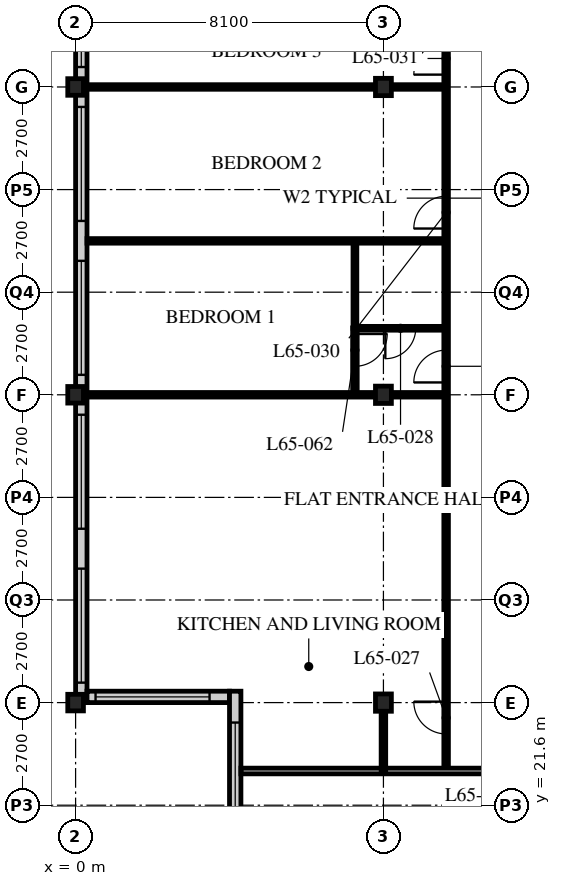
"""IFC4 building model, lengths in metres.
Left out: names, types, materials, properties, quantities, classifications, styles, units other than length and angle.
Written with IfcOpenShell. Run it as: python <this file> out.ifc"""

import sys

from ifc_helpers import new_model, si_unit, direction, frame, frame_2d, origin, origin_2d, place, context, subcontext, project, spatial, rectangle, i_section, extrude, element, fill, save


model = new_model("IFC4")
c1 = context("Model", 3, precision=1e-05, world=origin(), true_north=direction((0.0, 1.0)))
c2 = subcontext(c1, "Body", "Model", "MODEL_VIEW")
j1 = project(units=[si_unit("LENGTHUNIT", "METRE"), si_unit("PLANEANGLEUNIT", "RADIAN")], contexts=[c1])
p1 = place(None, origin())
s1 = spatial("IfcSite", under=j1, at=p1, CompositionType="ELEMENT")
p2 = place(p1, origin())
s2 = spatial("IfcBuilding", under=s1, at=p2, CompositionType="ELEMENT")
p3 = place(p2, frame((0.0, 0.0, 254.1)))
s3 = spatial("IfcBuildingStorey", under=s2, at=p3, CompositionType="ELEMENT", Elevation=254.1)
for number, where, z_axis, x_axis in (
    (1, (0.0, 24.3, 0.0), (0.0, 0.0, 1.0), (1.0, 0.0, 0.0)),
    (2, (0.0, 32.4, 0.0), (0.0, 0.0, 1.0), (1.0, 0.0, 0.0)),
    (3, (0.0, 40.5, 0.0), (0.0, 0.0, 1.0), (1.0, 0.0, 0.0)),
):
    element("IfcColumn", number, at=place(p3, frame(where, z_axis=z_axis, x_axis=x_axis)), inside=s3, PredefinedType="COLUMN", context=c2, shape_type="SweptSolid", body=[
        extrude(i_section(OverallWidth=0.412, OverallDepth=0.437, WebThickness=0.036, FlangeThickness=0.058, FilletRadius=0.015, at=origin_2d()), origin(), (0.0, 0.0, 1.0), 3.9),
    ])
for number, where, z_axis, x_axis in (
    (4, (8.1, 24.3, 0.0), (0.0, 0.0, 1.0), (1.0, 0.0, 0.0)),
    (5, (8.1, 32.4, 0.0), (0.0, 0.0, 1.0), (1.0, 0.0, 0.0)),
    (6, (8.1, 40.5, 0.0), (0.0, 0.0, 1.0), (1.0, 0.0, 0.0)),
):
    element("IfcColumn", number, at=place(p3, frame(where, z_axis=z_axis, x_axis=x_axis)), inside=s3, PredefinedType="COLUMN", context=c2, shape_type="SweptSolid", body=[
        extrude(i_section(OverallWidth=0.418, OverallDepth=0.456, WebThickness=0.042, FlangeThickness=0.067, FilletRadius=0.015, at=origin_2d()), origin(), (0.0, 0.0, 1.0), 3.9),
    ])
p4 = place(p3, frame((0.15, 56.4, 0.0), z_axis=(0.0, 0.0, 1.0), x_axis=(0.0, -1.0, 0.0)))
e7 = element("IfcWall", 7, at=p4, inside=s3, PredefinedType="SOLIDWALL", context=c2, shape_type="SweptSolid", body=[
    extrude(rectangle(XDim=32.1, YDim=0.3, at=frame_2d((16.05, 0.0))), origin(), (0.0, 0.0, 1.0), 3.69),
])
p5 = place(p4, frame((0.225, 0.0, 0.6)))
e8 = element("IfcOpeningElement", 8, at=p5, cuts=e7, PredefinedType="OPENING", context=c2, shape_type="SweptSolid", body=[
    extrude(rectangle(XDim=3.0, YDim=2.4, at=frame_2d((1.5, 1.2))), frame((0.0, 0.16, 0.0), z_axis=(0.0, -1.0, 0.0), x_axis=(1.0, 0.0, 0.0)), (0.0, 0.0, 1.0), 0.32),
])
p6 = place(p4, frame((4.275, 0.0, 0.6)))
e9 = element("IfcOpeningElement", 9, at=p6, cuts=e7, PredefinedType="OPENING", context=c2, shape_type="SweptSolid", body=[
    extrude(rectangle(XDim=3.0, YDim=2.4, at=frame_2d((1.5, 1.2))), frame((0.0, 0.16, 0.0), z_axis=(0.0, -1.0, 0.0), x_axis=(1.0, 0.0, 0.0)), (0.0, 0.0, 1.0), 0.32),
])
p7 = place(p4, frame((8.325, 0.0, 0.6)))
e10 = element("IfcOpeningElement", 10, at=p7, cuts=e7, PredefinedType="OPENING", context=c2, shape_type="SweptSolid", body=[
    extrude(rectangle(XDim=3.0, YDim=2.4, at=frame_2d((1.5, 1.2))), frame((0.0, 0.16, 0.0), z_axis=(0.0, -1.0, 0.0), x_axis=(1.0, 0.0, 0.0)), (0.0, 0.0, 1.0), 0.32),
])
p8 = place(p4, frame((12.375, 0.0, 0.6)))
e11 = element("IfcOpeningElement", 11, at=p8, cuts=e7, PredefinedType="OPENING", context=c2, shape_type="SweptSolid", body=[
    extrude(rectangle(XDim=3.0, YDim=2.4, at=frame_2d((1.5, 1.2))), frame((0.0, 0.16, 0.0), z_axis=(0.0, -1.0, 0.0), x_axis=(1.0, 0.0, 0.0)), (0.0, 0.0, 1.0), 0.32),
])
p9 = place(p4, frame((16.425, 0.0, 0.6)))
e12 = element("IfcOpeningElement", 12, at=p9, cuts=e7, PredefinedType="OPENING", context=c2, shape_type="SweptSolid", body=[
    extrude(rectangle(XDim=3.0, YDim=2.4, at=frame_2d((1.5, 1.2))), frame((0.0, 0.16, 0.0), z_axis=(0.0, -1.0, 0.0), x_axis=(1.0, 0.0, 0.0)), (0.0, 0.0, 1.0), 0.32),
])
p10 = place(p4, frame((20.475, 0.0, 0.6)))
e13 = element("IfcOpeningElement", 13, at=p10, cuts=e7, PredefinedType="OPENING", context=c2, shape_type="SweptSolid", body=[
    extrude(rectangle(XDim=3.0, YDim=2.4, at=frame_2d((1.5, 1.2))), frame((0.0, 0.16, 0.0), z_axis=(0.0, -1.0, 0.0), x_axis=(1.0, 0.0, 0.0)), (0.0, 0.0, 1.0), 0.32),
])
p11 = place(p4, frame((24.525, 0.0, 0.6)))
e14 = element("IfcOpeningElement", 14, at=p11, cuts=e7, PredefinedType="OPENING", context=c2, shape_type="SweptSolid", body=[
    extrude(rectangle(XDim=3.0, YDim=2.4, at=frame_2d((1.5, 1.2))), frame((0.0, 0.16, 0.0), z_axis=(0.0, -1.0, 0.0), x_axis=(1.0, 0.0, 0.0)), (0.0, 0.0, 1.0), 0.32),
])
p12 = place(p4, frame((28.575, 0.0, 0.6)))
e15 = element("IfcOpeningElement", 15, at=p12, cuts=e7, PredefinedType="OPENING", context=c2, shape_type="SweptSolid", body=[
    extrude(rectangle(XDim=3.0, YDim=2.4, at=frame_2d((1.5, 1.2))), frame((0.0, 0.16, 0.0), z_axis=(0.0, -1.0, 0.0), x_axis=(1.0, 0.0, 0.0)), (0.0, 0.0, 1.0), 0.32),
])
p13 = place(p3, frame((0.3, 24.45, 0.0), z_axis=(0.0, 0.0, 1.0), x_axis=(1.0, 0.0, 0.0)))
e16 = element("IfcWall", 16, at=p13, inside=s3, PredefinedType="SOLIDWALL", context=c2, shape_type="SweptSolid", body=[
    extrude(rectangle(XDim=3.75, YDim=0.3, at=frame_2d((1.875, 0.0))), origin(), (0.0, 0.0, 1.0), 3.69),
])
p14 = place(p13, frame((0.225, 0.0, 0.6)))
e17 = element("IfcOpeningElement", 17, at=p14, cuts=e16, PredefinedType="OPENING", context=c2, shape_type="SweptSolid", body=[
    extrude(rectangle(XDim=3.0, YDim=2.3, at=frame_2d((1.5, 1.15))), frame((0.0, 0.16, 0.0), z_axis=(0.0, -1.0, 0.0), x_axis=(1.0, 0.0, 0.0)), (0.0, 0.0, 1.0), 0.32),
])
p15 = place(p3, frame((4.2, 24.6, 0.0), z_axis=(0.0, 0.0, 1.0), x_axis=(0.0, -1.0, 0.0)))
e18 = element("IfcWall", 18, at=p15, inside=s3, PredefinedType="SOLIDWALL", context=c2, shape_type="SweptSolid", body=[
    extrude(rectangle(XDim=4.35, YDim=0.3, at=frame_2d((2.175, 0.0))), origin(), (0.0, 0.0, 1.0), 3.69),
])
p16 = place(p15, frame((0.825, 0.0, 0.6)))
e19 = element("IfcOpeningElement", 19, at=p16, cuts=e18, PredefinedType="OPENING", context=c2, shape_type="SweptSolid", body=[
    extrude(rectangle(XDim=3.0, YDim=2.3, at=frame_2d((1.5, 1.15))), frame((0.0, 0.16, 0.0), z_axis=(0.0, -1.0, 0.0), x_axis=(1.0, 0.0, 0.0)), (0.0, 0.0, 1.0), 0.32),
])
p17 = place(p3, frame((9.75, 22.5, 0.0), z_axis=(0.0, 0.0, 1.0), x_axis=(0.0, 1.0, 0.0)))
e20 = element("IfcWall", 20, at=p17, inside=s3, PredefinedType="PARTITIONING", context=c2, shape_type="SweptSolid", body=[
    extrude(rectangle(XDim=22.05, YDim=0.12, at=frame_2d((11.025, 0.0))), origin(), (0.0, 0.0, 1.0), 3.69),
])
p18 = place(p17, frame((0.975, 0.0, 0.0)))
e21 = element("IfcOpeningElement", 21, at=p18, cuts=e20, PredefinedType="OPENING", context=c2, shape_type="SweptSolid", body=[
    extrude(rectangle(XDim=0.85, YDim=2.1, at=frame_2d((0.425, 1.05))), frame((0.0, 0.07, 0.0), z_axis=(0.0, -1.0, 0.0), x_axis=(1.0, 0.0, 0.0)), (0.0, 0.0, 1.0), 0.14),
])
p19 = place(p17, frame((10.225, 0.0, 0.0)))
e22 = element("IfcOpeningElement", 22, at=p19, cuts=e20, PredefinedType="OPENING", context=c2, shape_type="SweptSolid", body=[
    extrude(rectangle(XDim=0.85, YDim=2.1, at=frame_2d((0.425, 1.05))), frame((0.0, 0.07, 0.0), z_axis=(0.0, -1.0, 0.0), x_axis=(1.0, 0.0, 0.0)), (0.0, 0.0, 1.0), 0.14),
])
p20 = place(p17, frame((14.275, 0.0, 0.0)))
e23 = element("IfcOpeningElement", 23, at=p20, cuts=e20, PredefinedType="OPENING", context=c2, shape_type="SweptSolid", body=[
    extrude(rectangle(XDim=0.85, YDim=2.1, at=frame_2d((0.425, 1.05))), frame((0.0, 0.07, 0.0), z_axis=(0.0, -1.0, 0.0), x_axis=(1.0, 0.0, 0.0)), (0.0, 0.0, 1.0), 0.14),
])
p21 = place(p17, frame((18.325, 0.0, 0.0)))
e24 = element("IfcOpeningElement", 24, at=p21, cuts=e20, PredefinedType="OPENING", context=c2, shape_type="SweptSolid", body=[
    extrude(rectangle(XDim=0.85, YDim=2.1, at=frame_2d((0.425, 1.05))), frame((0.0, 0.07, 0.0), z_axis=(0.0, -1.0, 0.0), x_axis=(1.0, 0.0, 0.0)), (0.0, 0.0, 1.0), 0.14),
])
p22 = place(p3, frame((9.75, 34.15, 0.0), z_axis=(0.0, 0.0, 1.0), x_axis=(-1.0, 0.0, 0.0)))
e25 = element("IfcWall", 25, at=p22, inside=s3, PredefinedType="PARTITIONING", context=c2, shape_type="SweptSolid", body=[
    extrude(rectangle(XDim=2.4, YDim=0.1, at=frame_2d((1.2, 0.0))), origin(), (0.0, 0.0, 1.0), 3.69),
])
p23 = place(p22, frame((0.8, 0.0, 0.0)))
e26 = element("IfcOpeningElement", 26, at=p23, cuts=e25, PredefinedType="OPENING", context=c2, shape_type="SweptSolid", body=[
    extrude(rectangle(XDim=0.8, YDim=2.1, at=frame_2d((0.4, 1.05))), frame((0.0, 0.06, 0.0), z_axis=(0.0, -1.0, 0.0), x_axis=(1.0, 0.0, 0.0)), (0.0, 0.0, 1.0), 0.12),
])
p24 = place(p3, frame((7.35, 34.15, 0.0), z_axis=(0.0, 0.0, 1.0), x_axis=(0.0, 1.0, 0.0)))
e27 = element("IfcWall", 27, at=p24, inside=s3, PredefinedType="PARTITIONING", context=c2, shape_type="SweptSolid", body=[
    extrude(rectangle(XDim=2.3, YDim=0.1, at=frame_2d((1.15, 0.0))), origin(), (0.0, 0.0, 1.0), 3.69),
])
p25 = place(p3, frame((9.75, 32.4, 0.0), z_axis=(0.0, 0.0, 1.0), x_axis=(-1.0, 0.0, 0.0)))
e28 = element("IfcWall", 28, at=p25, inside=s3, PredefinedType="PARTITIONING", context=c2, shape_type="SweptSolid", body=[
    extrude(rectangle(XDim=9.45, YDim=0.12, at=frame_2d((4.725, 0.0))), origin(), (0.0, 0.0, 1.0), 3.078),
])
p26 = place(p3, frame((9.75, 36.45, 0.0), z_axis=(0.0, 0.0, 1.0), x_axis=(-1.0, 0.0, 0.0)))
e29 = element("IfcWall", 29, at=p26, inside=s3, PredefinedType="PARTITIONING", context=c2, shape_type="SweptSolid", body=[
    extrude(rectangle(XDim=9.45, YDim=0.12, at=frame_2d((4.725, 0.0))), origin(), (0.0, 0.0, 1.0), 3.69),
])
p27 = place(p3, frame((9.75, 40.5, 0.0), z_axis=(0.0, 0.0, 1.0), x_axis=(-1.0, 0.0, 0.0)))
e30 = element("IfcWall", 30, at=p27, inside=s3, PredefinedType="PARTITIONING", context=c2, shape_type="SweptSolid", body=[
    extrude(rectangle(XDim=9.45, YDim=0.12, at=frame_2d((4.725, 0.0))), origin(), (0.0, 0.0, 1.0), 3.078),
])
p28 = place(p3, frame((4.35, 22.5, 0.0), z_axis=(0.0, 0.0, 1.0), x_axis=(1.0, 0.0, 0.0)))
e31 = element("IfcWall", 31, at=p28, inside=s3, PredefinedType="PARTITIONING", context=c2, shape_type="SweptSolid", body=[
    extrude(rectangle(XDim=7.8, YDim=0.15, at=frame_2d((3.9, 0.0))), origin(), (0.0, 0.0, 1.0), 3.69),
])
p29 = place(p3, frame((7.35, 32.4, 0.0), z_axis=(0.0, 0.0, 1.0), x_axis=(0.0, 1.0, 0.0)))
e32 = element("IfcWall", 32, at=p29, inside=s3, PredefinedType="PARTITIONING", context=c2, shape_type="SweptSolid", body=[
    extrude(rectangle(XDim=1.76, YDim=0.12, at=frame_2d((0.88, 0.0))), origin(), (0.0, 0.0, 1.0), 3.69),
])
p30 = place(p29, frame((0.75, 0.0, 0.0)))
e33 = element("IfcOpeningElement", 33, at=p30, cuts=e32, PredefinedType="OPENING", context=c2, shape_type="SweptSolid", body=[
    extrude(rectangle(XDim=0.85, YDim=2.1, at=frame_2d((0.425, 1.05))), frame((0.0, 0.07, 0.0), z_axis=(0.0, -1.0, 0.0), x_axis=(1.0, 0.0, 0.0)), (0.0, 0.0, 1.0), 0.14),
])
p31 = place(p3, frame((8.1, 22.5, 0.0), z_axis=(0.0, 0.0, 1.0), x_axis=(0.0, 1.0, 0.0)))
e34 = element("IfcWall", 34, at=p31, inside=s3, PredefinedType="PARTITIONING", context=c2, shape_type="SweptSolid", body=[
    extrude(rectangle(XDim=1.597, YDim=0.12, at=frame_2d((0.798, 0.0))), origin(), (0.0, 0.0, 1.0), 3.078),
])
p32 = place(p8, origin())
e35 = element("IfcWindow", 35, at=p32, inside=s3, PartitioningType="SINGLE_PANEL", PredefinedType="WINDOW", context=c2, shape_type="SweptSolid", body=[
    extrude(rectangle(XDim=3.0, YDim=2.4, at=frame_2d((1.5, 1.2))), frame((0.0, 0.03, 0.0), z_axis=(0.0, -1.0, 0.0), x_axis=(1.0, 0.0, 0.0)), (0.0, 0.0, 1.0), 0.06),
])
fill(e11, e35)
p33 = place(p9, origin())
e36 = element("IfcWindow", 36, at=p33, inside=s3, PartitioningType="SINGLE_PANEL", PredefinedType="WINDOW", context=c2, shape_type="SweptSolid", body=[
    extrude(rectangle(XDim=3.0, YDim=2.4, at=frame_2d((1.5, 1.2))), frame((0.0, 0.03, 0.0), z_axis=(0.0, -1.0, 0.0), x_axis=(1.0, 0.0, 0.0)), (0.0, 0.0, 1.0), 0.06),
])
fill(e12, e36)
p34 = place(p10, origin())
e37 = element("IfcWindow", 37, at=p34, inside=s3, PartitioningType="SINGLE_PANEL", PredefinedType="WINDOW", context=c2, shape_type="SweptSolid", body=[
    extrude(rectangle(XDim=3.0, YDim=2.4, at=frame_2d((1.5, 1.2))), frame((0.0, 0.03, 0.0), z_axis=(0.0, -1.0, 0.0), x_axis=(1.0, 0.0, 0.0)), (0.0, 0.0, 1.0), 0.06),
])
fill(e13, e37)
p35 = place(p11, origin())
e38 = element("IfcWindow", 38, at=p35, inside=s3, PartitioningType="SINGLE_PANEL", PredefinedType="WINDOW", context=c2, shape_type="SweptSolid", body=[
    extrude(rectangle(XDim=3.0, YDim=2.4, at=frame_2d((1.5, 1.2))), frame((0.0, 0.03, 0.0), z_axis=(0.0, -1.0, 0.0), x_axis=(1.0, 0.0, 0.0)), (0.0, 0.0, 1.0), 0.06),
])
fill(e14, e38)
p36 = place(p12, origin())
e39 = element("IfcWindow", 39, at=p36, inside=s3, PartitioningType="SINGLE_PANEL", PredefinedType="WINDOW", context=c2, shape_type="SweptSolid", body=[
    extrude(rectangle(XDim=3.0, YDim=2.4, at=frame_2d((1.5, 1.2))), frame((0.0, 0.03, 0.0), z_axis=(0.0, -1.0, 0.0), x_axis=(1.0, 0.0, 0.0)), (0.0, 0.0, 1.0), 0.06),
])
fill(e15, e39)
p37 = place(p14, origin())
e40 = element("IfcWindow", 40, at=p37, inside=s3, PartitioningType="SINGLE_PANEL", PredefinedType="WINDOW", context=c2, shape_type="SweptSolid", body=[
    extrude(rectangle(XDim=3.0, YDim=2.3, at=frame_2d((1.5, 1.15))), frame((0.0, 0.03, 0.0), z_axis=(0.0, -1.0, 0.0), x_axis=(1.0, 0.0, 0.0)), (0.0, 0.0, 1.0), 0.06),
])
fill(e17, e40)
p38 = place(p16, origin())
e41 = element("IfcWindow", 41, at=p38, inside=s3, PartitioningType="SINGLE_PANEL", PredefinedType="WINDOW", context=c2, shape_type="SweptSolid", body=[
    extrude(rectangle(XDim=3.0, YDim=2.3, at=frame_2d((1.5, 1.15))), frame((0.0, 0.03, 0.0), z_axis=(0.0, -1.0, 0.0), x_axis=(1.0, 0.0, 0.0)), (0.0, 0.0, 1.0), 0.06),
])
fill(e19, e41)
p39 = place(p18, origin())
e42 = element("IfcDoor", 42, at=p39, inside=s3, OperationType="SINGLE_SWING_RIGHT", PredefinedType="DOOR", context=c2, shape_type="SweptSolid", body=[
    extrude(rectangle(XDim=0.85, YDim=2.1, at=frame_2d((0.425, 1.05))), frame((0.0, 0.025, 0.0), z_axis=(0.0, -1.0, 0.0), x_axis=(1.0, 0.0, 0.0)), (0.0, 0.0, 1.0), 0.05),
])
fill(e21, e42)
p40 = place(p23, origin())
e43 = element("IfcDoor", 43, at=p40, inside=s3, OperationType="SINGLE_SWING_RIGHT", PredefinedType="DOOR", context=c2, shape_type="SweptSolid", body=[
    extrude(rectangle(XDim=0.8, YDim=2.1, at=frame_2d((0.4, 1.05))), frame((0.0, 0.025, 0.0), z_axis=(0.0, -1.0, 0.0), x_axis=(1.0, 0.0, 0.0)), (0.0, 0.0, 1.0), 0.05),
])
fill(e26, e43)
p41 = place(p19, origin())
e44 = element("IfcDoor", 44, at=p41, inside=s3, OperationType="SINGLE_SWING_LEFT", PredefinedType="DOOR", context=c2, shape_type="SweptSolid", body=[
    extrude(rectangle(XDim=0.85, YDim=2.1, at=frame_2d((0.425, 1.05))), frame((0.0, 0.025, 0.0), z_axis=(0.0, -1.0, 0.0), x_axis=(1.0, 0.0, 0.0)), (0.0, 0.0, 1.0), 0.05),
])
fill(e22, e44)
p42 = place(p20, origin())
e45 = element("IfcDoor", 45, at=p42, inside=s3, OperationType="SINGLE_SWING_LEFT", PredefinedType="DOOR", context=c2, shape_type="SweptSolid", body=[
    extrude(rectangle(XDim=0.85, YDim=2.1, at=frame_2d((0.425, 1.05))), frame((0.0, 0.025, 0.0), z_axis=(0.0, -1.0, 0.0), x_axis=(1.0, 0.0, 0.0)), (0.0, 0.0, 1.0), 0.05),
])
fill(e23, e45)
p43 = place(p21, origin())
e46 = element("IfcDoor", 46, at=p43, inside=s3, OperationType="SINGLE_SWING_LEFT", PredefinedType="DOOR", context=c2, shape_type="SweptSolid", body=[
    extrude(rectangle(XDim=0.85, YDim=2.1, at=frame_2d((0.425, 1.05))), frame((0.0, 0.025, 0.0), z_axis=(0.0, -1.0, 0.0), x_axis=(1.0, 0.0, 0.0)), (0.0, 0.0, 1.0), 0.05),
])
fill(e24, e46)
p44 = place(p30, origin())
e47 = element("IfcDoor", 47, at=p44, inside=s3, OperationType="SINGLE_SWING_LEFT", PredefinedType="DOOR", context=c2, shape_type="SweptSolid", body=[
    extrude(rectangle(XDim=0.85, YDim=2.1, at=frame_2d((0.425, 1.05))), frame((0.0, 0.025, 0.0), z_axis=(0.0, -1.0, 0.0), x_axis=(1.0, 0.0, 0.0)), (0.0, 0.0, 1.0), 0.05),
])
fill(e33, e47)
save(model, sys.argv[1])
